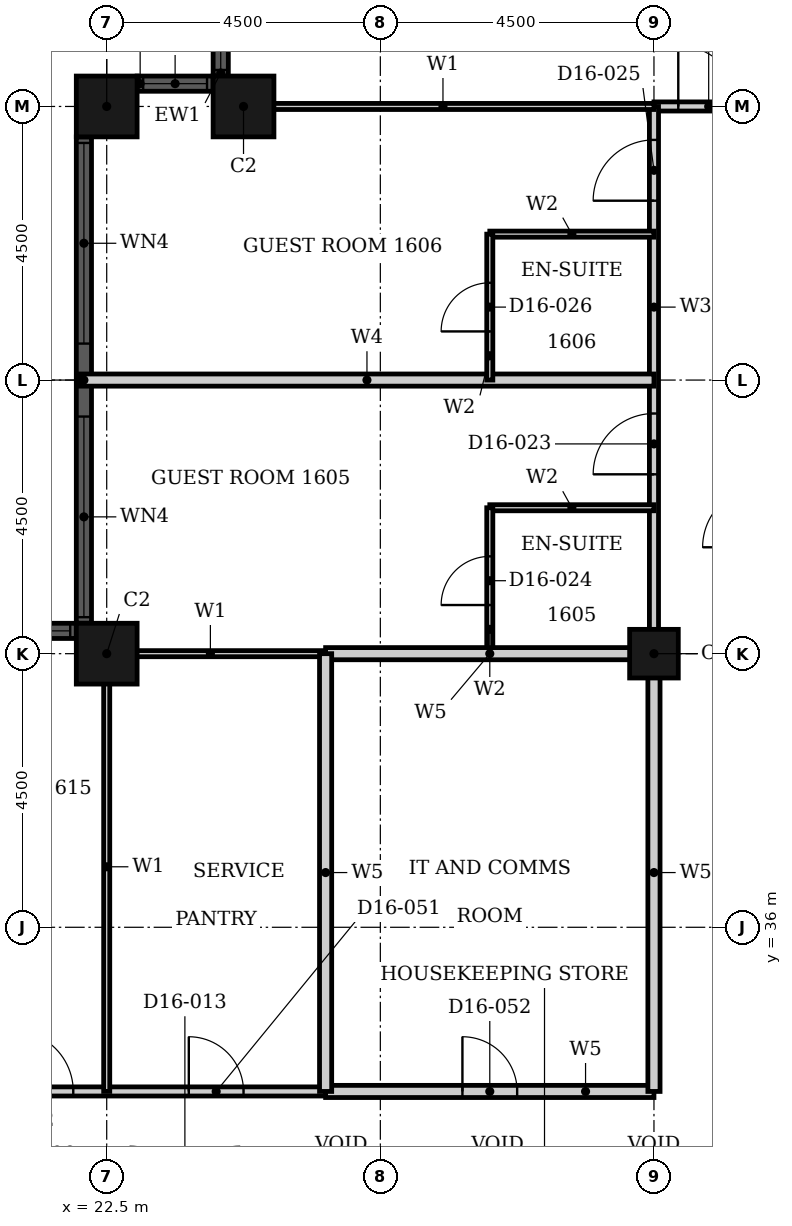
"""IFC4 building model, lengths in metres.
Left out: names, types, materials, properties, quantities, classifications, styles, units other than length and angle.
Written with IfcOpenShell. Run it as: python <this file> out.ifc"""

import sys

from ifc_helpers import new_model, si_unit, direction, frame, frame_2d, origin, origin_2d, place, context, subcontext, project, spatial, rectangle, hollow_rectangle, extrude, element, fill, save


model = new_model("IFC4")
c1 = context("Model", 3, precision=1e-05, world=origin(), true_north=direction((0.0, 1.0)))
c2 = subcontext(c1, "Body", "Model", "MODEL_VIEW")
j1 = project(units=[si_unit("LENGTHUNIT", "METRE"), si_unit("PLANEANGLEUNIT", "RADIAN")], contexts=[c1])
p1 = place(None, origin())
s1 = spatial("IfcSite", under=j1, at=p1, CompositionType="ELEMENT")
p2 = place(p1, origin())
s2 = spatial("IfcBuilding", under=s1, at=p2, CompositionType="ELEMENT")
p3 = place(p2, frame((0.0, 0.0, 70.8)))
s3 = spatial("IfcBuildingStorey", under=s2, at=p3, CompositionType="ELEMENT", Elevation=70.8)
for number, where, z_axis, x_axis in (
    (1, (24.75, 49.5, 0.0), (0.0, 0.0, 1.0), (1.0, 0.0, 0.0)),
    (2, (22.5, 49.5, 0.0), (0.0, 0.0, 1.0), (1.0, 0.0, 0.0)),
    (3, (22.5, 40.5, 0.0), (0.0, 0.0, 1.0), (1.0, 0.0, 0.0)),
):
    element("IfcColumn", number, at=place(p3, frame(where, z_axis=z_axis, x_axis=x_axis)), inside=s3, PredefinedType="COLUMN", context=c2, shape_type="SweptSolid", body=[
        extrude(hollow_rectangle(XDim=1.0, YDim=1.0, WallThickness=0.032, at=origin_2d()), origin(), (0.0, 0.0, 1.0), 3.6),
    ])
p4 = place(p3, frame((31.5, 40.5, 0.0), z_axis=(0.0, 0.0, 1.0), x_axis=(1.0, 0.0, 0.0)))
e4 = element("IfcColumn", 4, at=p4, inside=s3, PredefinedType="COLUMN", context=c2, shape_type="SweptSolid", body=[
    extrude(hollow_rectangle(XDim=0.8, YDim=0.8, WallThickness=0.025, at=origin_2d()), origin(), (0.0, 0.0, 1.0), 3.6),
])
p5 = place(p3, frame((24.375, 51.25, 0.0), z_axis=(0.0, 0.0, 1.0), x_axis=(0.0, -1.0, 0.0)))
e5 = element("IfcWall", 5, at=p5, inside=s3, PredefinedType="SOLIDWALL", context=c2, shape_type="SweptSolid", body=[
    extrude(rectangle(XDim=1.25, YDim=0.25, at=frame_2d((0.625, 0.0))), origin(), (0.0, 0.0, 1.0), 3.6),
])
p6 = place(p5, frame((0.1, 0.0, 0.9)))
e6 = element("IfcOpeningElement", 6, at=p6, cuts=e5, PredefinedType="OPENING", context=c2, shape_type="SweptSolid", body=[
    extrude(rectangle(XDim=1.05, YDim=2.08, at=frame_2d((0.525, 1.04))), frame((0.0, 0.135, 0.0), z_axis=(0.0, -1.0, 0.0), x_axis=(1.0, 0.0, 0.0)), (0.0, 0.0, 1.0), 0.27),
])
p7 = place(p3, frame((24.25, 49.875, 0.0), z_axis=(0.0, 0.0, 1.0), x_axis=(-1.0, 0.0, 0.0)))
e7 = element("IfcWall", 7, at=p7, inside=s3, PredefinedType="SOLIDWALL", context=c2, shape_type="SweptSolid", body=[
    extrude(rectangle(XDim=1.25, YDim=0.25, at=frame_2d((0.625, 0.0))), origin(), (0.0, 0.0, 1.0), 3.6),
])
p8 = place(p7, frame((0.1, 0.0, 0.9)))
e8 = element("IfcOpeningElement", 8, at=p8, cuts=e7, PredefinedType="OPENING", context=c2, shape_type="SweptSolid", body=[
    extrude(rectangle(XDim=1.05, YDim=2.08, at=frame_2d((0.525, 1.04))), frame((0.0, 0.135, 0.0), z_axis=(0.0, -1.0, 0.0), x_axis=(1.0, 0.0, 0.0)), (0.0, 0.0, 1.0), 0.27),
])
p9 = place(p3, frame((22.125, 49.0, 0.0), z_axis=(0.0, 0.0, 1.0), x_axis=(0.0, -1.0, 0.0)))
e9 = element("IfcWall", 9, at=p9, inside=s3, PredefinedType="SOLIDWALL", context=c2, shape_type="SweptSolid", body=[
    extrude(rectangle(XDim=8.0, YDim=0.25, at=frame_2d((4.0, 0.0))), origin(), (0.0, 0.0, 1.0), 3.6),
])
p10 = place(p9, frame((0.1, 0.0, 0.9)))
e10 = element("IfcOpeningElement", 10, at=p10, cuts=e9, PredefinedType="OPENING", context=c2, shape_type="SweptSolid", body=[
    extrude(rectangle(XDim=3.3, YDim=2.08, at=frame_2d((1.65, 1.04))), frame((0.0, 0.135, 0.0), z_axis=(0.0, -1.0, 0.0), x_axis=(1.0, 0.0, 0.0)), (0.0, 0.0, 1.0), 0.27),
])
p11 = place(p9, frame((4.6, 0.0, 0.9)))
e11 = element("IfcOpeningElement", 11, at=p11, cuts=e9, PredefinedType="OPENING", context=c2, shape_type="SweptSolid", body=[
    extrude(rectangle(XDim=3.3, YDim=2.08, at=frame_2d((1.65, 1.04))), frame((0.0, 0.135, 0.0), z_axis=(0.0, -1.0, 0.0), x_axis=(1.0, 0.0, 0.0)), (0.0, 0.0, 1.0), 0.27),
])
p12 = place(p3, frame((22.0, 40.875, 0.0), z_axis=(0.0, 0.0, 1.0), x_axis=(-1.0, 0.0, 0.0)))
e12 = element("IfcWall", 12, at=p12, inside=s3, PredefinedType="SOLIDWALL", context=c2, shape_type="SweptSolid", body=[
    extrude(rectangle(XDim=3.5, YDim=0.25, at=frame_2d((1.75, 0.0))), origin(), (0.0, 0.0, 1.0), 3.6),
])
p13 = place(p12, frame((0.1, 0.0, 0.9)))
e13 = element("IfcOpeningElement", 13, at=p13, cuts=e12, PredefinedType="OPENING", context=c2, shape_type="SweptSolid", body=[
    extrude(rectangle(XDim=3.3, YDim=2.08, at=frame_2d((1.65, 1.04))), frame((0.0, 0.135, 0.0), z_axis=(0.0, -1.0, 0.0), x_axis=(1.0, 0.0, 0.0)), (0.0, 0.0, 1.0), 0.27),
])
p14 = place(p3, frame((16.2, 33.3, 0.0), z_axis=(0.0, 0.0, 1.0), x_axis=(1.0, 0.0, 0.0)))
e14 = element("IfcWall", 14, at=p14, inside=s3, PredefinedType="PARTITIONING", context=c2, shape_type="SweptSolid", body=[
    extrude(rectangle(XDim=9.9, YDim=0.15, at=frame_2d((4.95, 0.0))), origin(), (0.0, 0.0, 1.0), 3.3),
])
p15 = place(p14, frame((4.75, 0.0, 0.0)))
e15 = element("IfcOpeningElement", 15, at=p15, cuts=e14, PredefinedType="OPENING", context=c2, shape_type="SweptSolid", body=[
    extrude(rectangle(XDim=1.0, YDim=2.1, at=frame_2d((0.5, 1.05))), frame((0.0, 0.085, 0.0), z_axis=(0.0, -1.0, 0.0), x_axis=(1.0, 0.0, 0.0)), (0.0, 0.0, 1.0), 0.17),
])
p16 = place(p14, frame((7.65, 0.0, 0.0)))
e16 = element("IfcOpeningElement", 16, at=p16, cuts=e14, PredefinedType="OPENING", context=c2, shape_type="SweptSolid", body=[
    extrude(rectangle(XDim=0.9, YDim=2.1, at=frame_2d((0.45, 1.05))), frame((0.0, 0.085, 0.0), z_axis=(0.0, -1.0, 0.0), x_axis=(1.0, 0.0, 0.0)), (0.0, 0.0, 1.0), 0.17),
])
p17 = place(p3, frame((31.5, 49.5, 0.0), z_axis=(0.0, 0.0, 1.0), x_axis=(1.0, 0.0, 0.0)))
e17 = element("IfcWall", 17, at=p17, inside=s3, PredefinedType="PARTITIONING", context=c2, shape_type="SweptSolid", body=[
    extrude(rectangle(XDim=1.8, YDim=0.15, at=frame_2d((0.9, 0.0))), origin(), (0.0, 0.0, 1.0), 3.3),
])
p18 = place(p17, frame((0.4, 0.0, 0.0)))
e18 = element("IfcOpeningElement", 18, at=p18, cuts=e17, PredefinedType="OPENING", context=c2, shape_type="SweptSolid", body=[
    extrude(rectangle(XDim=1.0, YDim=2.1, at=frame_2d((0.5, 1.05))), frame((0.0, 0.085, 0.0), z_axis=(0.0, -1.0, 0.0), x_axis=(1.0, 0.0, 0.0)), (0.0, 0.0, 1.0), 0.17),
])
p19 = place(p3, frame((31.5, 40.5, 0.0), z_axis=(0.0, 0.0, 1.0), x_axis=(0.0, 1.0, 0.0)))
e19 = element("IfcWall", 19, at=p19, inside=s3, PredefinedType="PARTITIONING", context=c2, shape_type="SweptSolid", body=[
    extrude(rectangle(XDim=9.0, YDim=0.15, at=frame_2d((4.5, 0.0))), origin(), (0.0, 0.0, 1.0), 2.58),
])
p20 = place(p19, frame((2.95, 0.0, 0.0)))
e20 = element("IfcOpeningElement", 20, at=p20, cuts=e19, PredefinedType="OPENING", context=c2, shape_type="SweptSolid", body=[
    extrude(rectangle(XDim=1.0, YDim=2.1, at=frame_2d((0.5, 1.05))), frame((0.0, 0.085, 0.0), z_axis=(0.0, -1.0, 0.0), x_axis=(1.0, 0.0, 0.0)), (0.0, 0.0, 1.0), 0.17),
])
p21 = place(p19, frame((7.45, 0.0, 0.0)))
e21 = element("IfcOpeningElement", 21, at=p21, cuts=e19, PredefinedType="OPENING", context=c2, shape_type="SweptSolid", body=[
    extrude(rectangle(XDim=1.0, YDim=2.1, at=frame_2d((0.5, 1.05))), frame((0.0, 0.085, 0.0), z_axis=(0.0, -1.0, 0.0), x_axis=(1.0, 0.0, 0.0)), (0.0, 0.0, 1.0), 0.17),
])
p22 = place(p3, frame((22.31, 40.5, 0.0), z_axis=(0.0, 0.0, 1.0), x_axis=(1.0, 0.0, 0.0)))
e22 = element("IfcWall", 22, at=p22, inside=s3, PredefinedType="PARTITIONING", context=c2, shape_type="SweptSolid", body=[
    extrude(rectangle(XDim=3.79, YDim=0.1, at=frame_2d((1.895, 0.0))), origin(), (0.0, 0.0, 1.0), 2.38),
])
p23 = place(p3, frame((24.56, 49.5, 0.0), z_axis=(0.0, 0.0, 1.0), x_axis=(1.0, 0.0, 0.0)))
e23 = element("IfcWall", 23, at=p23, inside=s3, PredefinedType="PARTITIONING", context=c2, shape_type="SweptSolid", body=[
    extrude(rectangle(XDim=6.94, YDim=0.1, at=frame_2d((3.47, 0.0))), origin(), (0.0, 0.0, 1.0), 3.3),
])
p24 = place(p3, frame((22.5, 33.3, 0.0), z_axis=(0.0, 0.0, 1.0), x_axis=(0.0, 1.0, 0.0)))
e24 = element("IfcWall", 24, at=p24, inside=s3, PredefinedType="PARTITIONING", context=c2, shape_type="SweptSolid", body=[
    extrude(rectangle(XDim=7.39, YDim=0.1, at=frame_2d((3.695, 0.0))), origin(), (0.0, 0.0, 1.0), 3.3),
])
p25 = place(p3, frame((22.06, 45.0, 0.0), z_axis=(0.0, 0.0, 1.0), x_axis=(1.0, 0.0, 0.0)))
e25 = element("IfcWall", 25, at=p25, inside=s3, PredefinedType="PARTITIONING", context=c2, shape_type="SweptSolid", body=[
    extrude(rectangle(XDim=9.44, YDim=0.2, at=frame_2d((4.72, 0.0))), origin(), (0.0, 0.0, 1.0), 3.3),
])
for number, where, z_axis, x_axis in (
    (26, (28.8, 42.9, 0.0), (0.0, 0.0, 1.0), (1.0, 0.0, 0.0)),
    (27, (28.8, 47.4, 0.0), (0.0, 0.0, 1.0), (1.0, 0.0, 0.0)),
):
    element("IfcWall", number, at=place(p3, frame(where, z_axis=z_axis, x_axis=x_axis)), inside=s3, PredefinedType="PARTITIONING", context=c2, shape_type="SweptSolid", body=[
        extrude(rectangle(XDim=2.7, YDim=0.1, at=frame_2d((1.35, 0.0))), origin(), (0.0, 0.0, 1.0), 3.3),
    ])
p26 = place(p3, frame((28.8, 40.5, 0.0), z_axis=(0.0, 0.0, 1.0), x_axis=(0.0, 1.0, 0.0)))
e28 = element("IfcWall", 28, at=p26, inside=s3, PredefinedType="PARTITIONING", context=c2, shape_type="SweptSolid", body=[
    extrude(rectangle(XDim=2.4, YDim=0.1, at=frame_2d((1.2, 0.0))), origin(), (0.0, 0.0, 1.0), 3.3),
])
p27 = place(p26, frame((0.8, 0.0, 0.0)))
e29 = element("IfcOpeningElement", 29, at=p27, cuts=e28, PredefinedType="OPENING", context=c2, shape_type="SweptSolid", body=[
    extrude(rectangle(XDim=0.8, YDim=2.1, at=frame_2d((0.4, 1.05))), frame((0.0, 0.06, 0.0), z_axis=(0.0, -1.0, 0.0), x_axis=(1.0, 0.0, 0.0)), (0.0, 0.0, 1.0), 0.12),
])
p28 = place(p3, frame((28.8, 45.0, 0.0), z_axis=(0.0, 0.0, 1.0), x_axis=(0.0, 1.0, 0.0)))
e30 = element("IfcWall", 30, at=p28, inside=s3, PredefinedType="PARTITIONING", context=c2, shape_type="SweptSolid", body=[
    extrude(rectangle(XDim=2.4, YDim=0.1, at=frame_2d((1.2, 0.0))), origin(), (0.0, 0.0, 1.0), 3.3),
])
p29 = place(p28, frame((0.8, 0.0, 0.0)))
e31 = element("IfcOpeningElement", 31, at=p29, cuts=e30, PredefinedType="OPENING", context=c2, shape_type="SweptSolid", body=[
    extrude(rectangle(XDim=0.8, YDim=2.1, at=frame_2d((0.4, 1.05))), frame((0.0, 0.06, 0.0), z_axis=(0.0, -1.0, 0.0), x_axis=(1.0, 0.0, 0.0)), (0.0, 0.0, 1.0), 0.12),
])
p30 = place(p3, frame((26.1, 33.3, 0.0), z_axis=(0.0, 0.0, 1.0), x_axis=(1.0, 0.0, 0.0)))
e32 = element("IfcWall", 32, at=p30, inside=s3, PredefinedType="PARTITIONING", context=c2, shape_type="SweptSolid", body=[
    extrude(rectangle(XDim=5.4, YDim=0.2, at=frame_2d((2.7, 0.0))), origin(), (0.0, 0.0, 1.0), 3.3),
])
p31 = place(p30, frame((2.25, 0.0, 0.0)))
e33 = element("IfcOpeningElement", 33, at=p31, cuts=e32, PredefinedType="OPENING", context=c2, shape_type="SweptSolid", body=[
    extrude(rectangle(XDim=0.9, YDim=2.1, at=frame_2d((0.45, 1.05))), frame((0.0, 0.11, 0.0), z_axis=(0.0, -1.0, 0.0), x_axis=(1.0, 0.0, 0.0)), (0.0, 0.0, 1.0), 0.22),
])
p32 = place(p3, frame((26.1, 40.5, 0.0), z_axis=(0.0, 0.0, 1.0), x_axis=(1.0, 0.0, 0.0)))
e34 = element("IfcWall", 34, at=p32, inside=s3, PredefinedType="PARTITIONING", context=c2, shape_type="SweptSolid", body=[
    extrude(rectangle(XDim=5.4, YDim=0.2, at=frame_2d((2.7, 0.0))), origin(), (0.0, 0.0, 1.0), 2.38),
])
for number, where, z_axis, x_axis in (
    (35, (26.1, 33.3, 0.0), (0.0, 0.0, 1.0), (0.0, 1.0, 0.0)),
    (36, (31.5, 33.3, 0.0), (0.0, 0.0, 1.0), (0.0, 1.0, 0.0)),
):
    element("IfcWall", number, at=place(p3, frame(where, z_axis=z_axis, x_axis=x_axis)), inside=s3, PredefinedType="PARTITIONING", context=c2, shape_type="SweptSolid", body=[
        extrude(rectangle(XDim=7.2, YDim=0.2, at=frame_2d((3.6, 0.0))), origin(), (0.0, 0.0, 1.0), 3.3),
    ])
p33 = place(p6, origin())
e37 = element("IfcWindow", 37, at=p33, inside=s3, PartitioningType="SINGLE_PANEL", PredefinedType="WINDOW", context=c2, shape_type="SweptSolid", body=[
    extrude(rectangle(XDim=1.05, YDim=2.08, at=frame_2d((0.525, 1.04))), frame((0.0, 0.03, 0.0), z_axis=(0.0, -1.0, 0.0), x_axis=(1.0, 0.0, 0.0)), (0.0, 0.0, 1.0), 0.06),
])
fill(e6, e37)
p34 = place(p8, origin())
e38 = element("IfcWindow", 38, at=p34, inside=s3, PartitioningType="SINGLE_PANEL", PredefinedType="WINDOW", context=c2, shape_type="SweptSolid", body=[
    extrude(rectangle(XDim=1.05, YDim=2.08, at=frame_2d((0.525, 1.04))), frame((0.0, 0.03, 0.0), z_axis=(0.0, -1.0, 0.0), x_axis=(1.0, 0.0, 0.0)), (0.0, 0.0, 1.0), 0.06),
])
fill(e8, e38)
p35 = place(p10, origin())
e39 = element("IfcWindow", 39, at=p35, inside=s3, PartitioningType="SINGLE_PANEL", PredefinedType="WINDOW", context=c2, shape_type="SweptSolid", body=[
    extrude(rectangle(XDim=3.3, YDim=2.08, at=frame_2d((1.65, 1.04))), frame((0.0, 0.03, 0.0), z_axis=(0.0, -1.0, 0.0), x_axis=(1.0, 0.0, 0.0)), (0.0, 0.0, 1.0), 0.06),
])
fill(e10, e39)
p36 = place(p11, origin())
e40 = element("IfcWindow", 40, at=p36, inside=s3, PartitioningType="SINGLE_PANEL", PredefinedType="WINDOW", context=c2, shape_type="SweptSolid", body=[
    extrude(rectangle(XDim=3.3, YDim=2.08, at=frame_2d((1.65, 1.04))), frame((0.0, 0.03, 0.0), z_axis=(0.0, -1.0, 0.0), x_axis=(1.0, 0.0, 0.0)), (0.0, 0.0, 1.0), 0.06),
])
fill(e11, e40)
p37 = place(p13, origin())
e41 = element("IfcWindow", 41, at=p37, inside=s3, PartitioningType="SINGLE_PANEL", PredefinedType="WINDOW", context=c2, shape_type="SweptSolid", body=[
    extrude(rectangle(XDim=3.3, YDim=2.08, at=frame_2d((1.65, 1.04))), frame((0.0, 0.03, 0.0), z_axis=(0.0, -1.0, 0.0), x_axis=(1.0, 0.0, 0.0)), (0.0, 0.0, 1.0), 0.06),
])
fill(e13, e41)
p38 = place(p20, origin())
e42 = element("IfcDoor", 42, at=p38, inside=s3, OperationType="SINGLE_SWING_RIGHT", PredefinedType="DOOR", context=c2, shape_type="SweptSolid", body=[
    extrude(rectangle(XDim=1.0, YDim=2.1, at=frame_2d((0.5, 1.05))), frame((0.0, 0.025, 0.0), z_axis=(0.0, -1.0, 0.0), x_axis=(1.0, 0.0, 0.0)), (0.0, 0.0, 1.0), 0.05),
])
fill(e20, e42)
p39 = place(p27, origin())
e43 = element("IfcDoor", 43, at=p39, inside=s3, OperationType="SINGLE_SWING_LEFT", PredefinedType="DOOR", context=c2, shape_type="SweptSolid", body=[
    extrude(rectangle(XDim=0.8, YDim=2.1, at=frame_2d((0.4, 1.05))), frame((0.0, 0.025, 0.0), z_axis=(0.0, -1.0, 0.0), x_axis=(1.0, 0.0, 0.0)), (0.0, 0.0, 1.0), 0.05),
])
fill(e29, e43)
p40 = place(p21, origin())
e44 = element("IfcDoor", 44, at=p40, inside=s3, OperationType="SINGLE_SWING_RIGHT", PredefinedType="DOOR", context=c2, shape_type="SweptSolid", body=[
    extrude(rectangle(XDim=1.0, YDim=2.1, at=frame_2d((0.5, 1.05))), frame((0.0, 0.025, 0.0), z_axis=(0.0, -1.0, 0.0), x_axis=(1.0, 0.0, 0.0)), (0.0, 0.0, 1.0), 0.05),
])
fill(e21, e44)
p41 = place(p29, origin())
e45 = element("IfcDoor", 45, at=p41, inside=s3, OperationType="SINGLE_SWING_LEFT", PredefinedType="DOOR", context=c2, shape_type="SweptSolid", body=[
    extrude(rectangle(XDim=0.8, YDim=2.1, at=frame_2d((0.4, 1.05))), frame((0.0, 0.025, 0.0), z_axis=(0.0, -1.0, 0.0), x_axis=(1.0, 0.0, 0.0)), (0.0, 0.0, 1.0), 0.05),
])
fill(e31, e45)
p42 = place(p18, origin())
e46 = element("IfcDoor", 46, at=p42, inside=s3, OperationType="SINGLE_SWING_LEFT", PredefinedType="DOOR", context=c2, shape_type="SweptSolid", body=[
    extrude(rectangle(XDim=1.0, YDim=2.1, at=frame_2d((0.5, 1.05))), frame((0.0, 0.025, 0.0), z_axis=(0.0, -1.0, 0.0), x_axis=(1.0, 0.0, 0.0)), (0.0, 0.0, 1.0), 0.05),
])
fill(e18, e46)
p43 = place(p15, origin())
e47 = element("IfcDoor", 47, at=p43, inside=s3, OperationType="SINGLE_SWING_RIGHT", PredefinedType="DOOR", context=c2, shape_type="SweptSolid", body=[
    extrude(rectangle(XDim=1.0, YDim=2.1, at=frame_2d((0.5, 1.05))), frame((0.0, 0.025, 0.0), z_axis=(0.0, -1.0, 0.0), x_axis=(1.0, 0.0, 0.0)), (0.0, 0.0, 1.0), 0.05),
])
fill(e15, e47)
p44 = place(p16, origin())
e48 = element("IfcDoor", 48, at=p44, inside=s3, OperationType="SINGLE_SWING_RIGHT", PredefinedType="DOOR", context=c2, shape_type="SweptSolid", body=[
    extrude(rectangle(XDim=0.9, YDim=2.1, at=frame_2d((0.45, 1.05))), frame((0.0, 0.025, 0.0), z_axis=(0.0, -1.0, 0.0), x_axis=(1.0, 0.0, 0.0)), (0.0, 0.0, 1.0), 0.05),
])
fill(e16, e48)
p45 = place(p31, origin())
e49 = element("IfcDoor", 49, at=p45, inside=s3, OperationType="SINGLE_SWING_LEFT", PredefinedType="DOOR", context=c2, shape_type="SweptSolid", body=[
    extrude(rectangle(XDim=0.9, YDim=2.1, at=frame_2d((0.45, 1.05))), frame((0.0, 0.025, 0.0), z_axis=(0.0, -1.0, 0.0), x_axis=(1.0, 0.0, 0.0)), (0.0, 0.0, 1.0), 0.05),
])
fill(e33, e49)
save(model, sys.argv[1])
